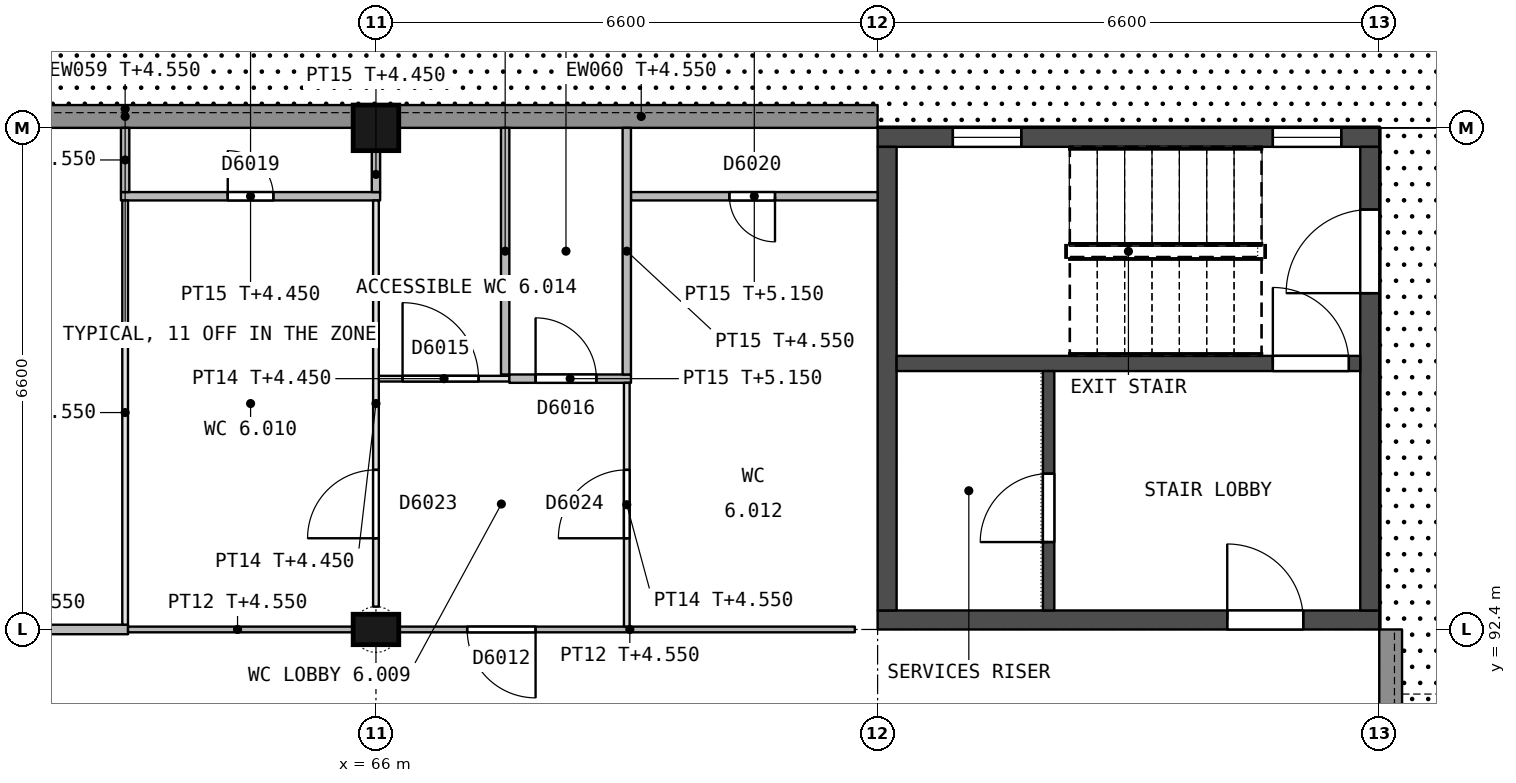
"""IFC4 building model, lengths in metres.
Left out: names, types, materials, properties, quantities, classifications, styles, units other than length and angle.
Written with IfcOpenShell. Run it as: python <this file> out.ifc"""

import sys

from ifc_helpers import new_model, si_unit, direction, frame, frame_2d, origin, origin_2d, place, context, subcontext, project, spatial, rectangle, extrude, element, fill, save


model = new_model("IFC4")
c1 = context("Model", 3, precision=1e-05, world=origin(), true_north=direction((0.0, 1.0)))
c2 = subcontext(c1, "Body", "Model", "MODEL_VIEW")
j1 = project(units=[si_unit("LENGTHUNIT", "METRE"), si_unit("PLANEANGLEUNIT", "RADIAN")], contexts=[c1])
p1 = place(None, origin())
s1 = spatial("IfcSite", under=j1, at=p1, CompositionType="ELEMENT")
p2 = place(p1, origin())
s2 = spatial("IfcBuilding", under=s1, at=p2, CompositionType="ELEMENT")
p3 = place(p2, origin())
s3 = spatial("IfcBuildingStorey", under=s2, at=p3, CompositionType="ELEMENT", Elevation=0.0)
p4 = place(p3, frame((66.0, 92.4, 0.0), z_axis=(0.0, 0.0, 1.0), x_axis=(1.0, 0.0, 0.0)))
e1 = element("IfcColumn", 1, at=p4, inside=s3, PredefinedType="COLUMN", context=c2, shape_type="SweptSolid", body=[
    extrude(rectangle(XDim=0.6, YDim=0.4, at=origin_2d()), origin(), (0.0, 0.0, 1.0), 5.4),
])
p5 = place(p3, frame((66.0, 99.0, 0.0), z_axis=(0.0, 0.0, 1.0), x_axis=(1.0, 0.0, 0.0)))
e2 = element("IfcColumn", 2, at=p5, inside=s3, PredefinedType="COLUMN", context=c2, shape_type="SweptSolid", body=[
    extrude(rectangle(XDim=0.6, YDim=0.6, at=origin_2d()), origin(), (0.0, 0.0, 1.0), 5.4),
])
p6 = place(p3, frame((72.6, 92.525, 0.0), z_axis=(0.0, 0.0, 1.0), x_axis=(1.0, 0.0, 0.0)))
e3 = element("IfcWall", 3, at=p6, inside=s3, PredefinedType="SHEAR", context=c2, shape_type="SweptSolid", body=[
    extrude(rectangle(XDim=6.6, YDim=0.25, at=frame_2d((3.3, 0.0))), origin(), (0.0, 0.0, 1.0), 5.15),
])
p7 = place(p6, frame((4.6, 0.0, 0.0)))
e4 = element("IfcOpeningElement", 4, at=p7, cuts=e3, PredefinedType="OPENING", context=c2, shape_type="SweptSolid", body=[
    extrude(rectangle(XDim=1.0, YDim=2.1, at=frame_2d((0.5, 1.05))), frame((0.0, 0.135, 0.0), z_axis=(0.0, -1.0, 0.0), x_axis=(1.0, 0.0, 0.0)), (0.0, 0.0, 1.0), 0.27),
])
p8 = place(p3, frame((72.6, 98.875, 0.0), z_axis=(0.0, 0.0, 1.0), x_axis=(1.0, 0.0, 0.0)))
e5 = element("IfcWall", 5, at=p8, inside=s3, PredefinedType="SHEAR", context=c2, shape_type="SweptSolid", body=[
    extrude(rectangle(XDim=6.6, YDim=0.25, at=frame_2d((3.3, 0.0))), origin(), (0.0, 0.0, 1.0), 5.15),
])
p9 = place(p8, frame((0.99, 0.0, 2.05)))
e6 = element("IfcOpeningElement", 6, at=p9, cuts=e5, PredefinedType="OPENING", context=c2, shape_type="SweptSolid", body=[
    extrude(rectangle(XDim=0.9, YDim=1.2, at=frame_2d((0.45, 0.6))), frame((0.0, 0.135, 0.0), z_axis=(0.0, -1.0, 0.0), x_axis=(1.0, 0.0, 0.0)), (0.0, 0.0, 1.0), 0.27),
])
p10 = place(p8, frame((5.2, 0.0, 3.4)))
e7 = element("IfcOpeningElement", 7, at=p10, cuts=e5, PredefinedType="OPENING", context=c2, shape_type="SweptSolid", body=[
    extrude(rectangle(XDim=0.9, YDim=1.2, at=frame_2d((0.45, 0.6))), frame((0.0, 0.135, 0.0), z_axis=(0.0, -1.0, 0.0), x_axis=(1.0, 0.0, 0.0)), (0.0, 0.0, 1.0), 0.27),
])
p11 = place(p3, frame((79.075, 92.65, 0.0), z_axis=(0.0, 0.0, 1.0), x_axis=(0.0, 1.0, 0.0)))
e8 = element("IfcWall", 8, at=p11, inside=s3, PredefinedType="SHEAR", context=c2, shape_type="SweptSolid", body=[
    extrude(rectangle(XDim=6.1, YDim=0.25, at=frame_2d((3.05, 0.0))), origin(), (0.0, 0.0, 1.0), 5.15),
])
p12 = place(p11, frame((4.175, 0.0, 0.0)))
e9 = element("IfcOpeningElement", 9, at=p12, cuts=e8, PredefinedType="OPENING", context=c2, shape_type="SweptSolid", body=[
    extrude(rectangle(XDim=1.1, YDim=2.4, at=frame_2d((0.55, 1.2))), frame((0.0, 0.135, 0.0), z_axis=(0.0, -1.0, 0.0), x_axis=(1.0, 0.0, 0.0)), (0.0, 0.0, 1.0), 0.27),
])
p13 = place(p3, frame((72.725, 92.65, 0.0), z_axis=(0.0, 0.0, 1.0), x_axis=(0.0, 1.0, 0.0)))
e10 = element("IfcWall", 10, at=p13, inside=s3, PredefinedType="SHEAR", context=c2, shape_type="SweptSolid", body=[
    extrude(rectangle(XDim=6.1, YDim=0.25, at=frame_2d((3.05, 0.0))), origin(), (0.0, 0.0, 1.0), 5.15),
])
p14 = place(p3, frame((72.85, 95.9, 0.0), z_axis=(0.0, 0.0, 1.0), x_axis=(1.0, 0.0, 0.0)))
e11 = element("IfcWall", 11, at=p14, inside=s3, PredefinedType="SHEAR", context=c2, shape_type="SweptSolid", body=[
    extrude(rectangle(XDim=6.1, YDim=0.2, at=frame_2d((3.05, 0.0))), origin(), (0.0, 0.0, 1.0), 5.15),
])
p15 = place(p14, frame((4.95, 0.0, 0.0)))
e12 = element("IfcOpeningElement", 12, at=p15, cuts=e11, PredefinedType="OPENING", context=c2, shape_type="SweptSolid", body=[
    extrude(rectangle(XDim=1.0, YDim=2.1, at=frame_2d((0.5, 1.05))), frame((0.0, 0.11, 0.0), z_axis=(0.0, -1.0, 0.0), x_axis=(1.0, 0.0, 0.0)), (0.0, 0.0, 1.0), 0.22),
])
p16 = place(p3, frame((74.85, 92.65, 0.0), z_axis=(0.0, 0.0, 1.0), x_axis=(0.0, 1.0, 0.0)))
e13 = element("IfcWall", 13, at=p16, inside=s3, PredefinedType="SHEAR", context=c2, shape_type="SweptSolid", body=[
    extrude(rectangle(XDim=3.15, YDim=0.15, at=frame_2d((1.575, 0.0))), origin(), (0.0, 0.0, 1.0), 5.15),
])
p17 = place(p16, frame((0.9, 0.0, 0.0)))
e14 = element("IfcOpeningElement", 14, at=p17, cuts=e13, PredefinedType="OPENING", context=c2, shape_type="SweptSolid", body=[
    extrude(rectangle(XDim=0.9, YDim=2.1, at=frame_2d((0.45, 1.05))), frame((0.0, 0.085, 0.0), z_axis=(0.0, -1.0, 0.0), x_axis=(1.0, 0.0, 0.0)), (0.0, 0.0, 1.0), 0.17),
])
p18 = place(p3, frame((79.35, 92.4, 0.0), z_axis=(0.0, 0.0, 1.0), x_axis=(0.0, -1.0, 0.0)))
e15 = element("IfcWall", 15, at=p18, inside=s3, PredefinedType="STANDARD", context=c2, shape_type="SweptSolid", body=[
    extrude(rectangle(XDim=3.1, YDim=0.3, at=frame_2d((1.55, 0.0))), origin(), (0.0, 0.0, 1.0), 4.55),
])
p19 = place(p18, frame((1.05, 0.0, 1.1)))
e16 = element("IfcOpeningElement", 16, at=p19, cuts=e15, PredefinedType="OPENING", context=c2, shape_type="SweptSolid", body=[
    extrude(rectangle(XDim=1.2, YDim=1.2, at=frame_2d((0.6, 0.6))), frame((0.0, 0.16, 0.0), z_axis=(0.0, -1.0, 0.0), x_axis=(1.0, 0.0, 0.0)), (0.0, 0.0, 1.0), 0.32),
])
p20 = place(p3, frame((59.7, 99.15, 0.0), z_axis=(0.0, 0.0, 1.0), x_axis=(1.0, 0.0, 0.0)))
e17 = element("IfcWall", 17, at=p20, inside=s3, PredefinedType="STANDARD", context=c2, shape_type="SweptSolid", body=[
    extrude(rectangle(XDim=6.0, YDim=0.3, at=frame_2d((3.0, 0.0))), origin(), (0.0, 0.0, 1.0), 4.55),
])
p21 = place(p3, frame((66.3, 99.15, 0.0), z_axis=(0.0, 0.0, 1.0), x_axis=(1.0, 0.0, 0.0)))
e18 = element("IfcWall", 18, at=p21, inside=s3, PredefinedType="STANDARD", context=c2, shape_type="SweptSolid", body=[
    extrude(rectangle(XDim=6.3, YDim=0.3, at=frame_2d((3.15, 0.0))), origin(), (0.0, 0.0, 1.0), 4.55),
])
p22 = place(p3, frame((59.7, 92.4, 0.0), z_axis=(0.0, 0.0, 1.0), x_axis=(1.0, 0.0, 0.0)))
e19 = element("IfcWall", 19, at=p22, inside=s3, PredefinedType="PARTITIONING", context=c2, shape_type="SweptSolid", body=[
    extrude(rectangle(XDim=3.038, YDim=0.125, at=frame_2d((1.519, 0.0))), origin(), (0.0, 0.0, 1.0), 4.55),
])
p23 = place(p3, frame((62.738, 92.4, 0.0), z_axis=(0.0, 0.0, 1.0), x_axis=(1.0, 0.0, 0.0)))
e20 = element("IfcWall", 20, at=p23, inside=s3, PredefinedType="PARTITIONING", context=c2, shape_type="SweptSolid", body=[
    extrude(rectangle(XDim=2.962, YDim=0.075, at=frame_2d((1.481, 0.0))), origin(), (0.0, 0.0, 1.0), 4.55),
])
p24 = place(p3, frame((66.3, 92.4, 0.0), z_axis=(0.0, 0.0, 1.0), x_axis=(1.0, 0.0, 0.0)))
e21 = element("IfcWall", 21, at=p24, inside=s3, PredefinedType="PARTITIONING", context=c2, shape_type="SweptSolid", body=[
    extrude(rectangle(XDim=6.0, YDim=0.075, at=frame_2d((3.0, 0.0))), origin(), (0.0, 0.0, 1.0), 4.55),
])
p25 = place(p24, frame((0.9, 0.0, 0.0)))
e22 = element("IfcOpeningElement", 22, at=p25, cuts=e21, PredefinedType="OPENING", context=c2, shape_type="SweptSolid", body=[
    extrude(rectangle(XDim=0.9, YDim=2.1, at=frame_2d((0.45, 1.05))), frame((0.0, 0.047, 0.0), z_axis=(0.0, -1.0, 0.0), x_axis=(1.0, 0.0, 0.0)), (0.0, 0.0, 1.0), 0.095),
])
p26 = place(p3, frame((67.755, 95.7, 0.0), z_axis=(0.0, 0.0, 1.0), x_axis=(-1.0, 0.0, 0.0)))
e23 = element("IfcWall", 23, at=p26, inside=s3, PredefinedType="PARTITIONING", context=c2, shape_type="SweptSolid", body=[
    extrude(rectangle(XDim=1.718, YDim=0.075, at=frame_2d((0.859, 0.0))), origin(), (0.0, 0.0, 1.0), 4.45),
])
p27 = place(p26, frame((0.405, 0.0, 0.0)))
e24 = element("IfcOpeningElement", 24, at=p27, cuts=e23, PredefinedType="OPENING", context=c2, shape_type="SweptSolid", body=[
    extrude(rectangle(XDim=1.0, YDim=2.1, at=frame_2d((0.5, 1.05))), frame((0.0, 0.047, 0.0), z_axis=(0.0, -1.0, 0.0), x_axis=(1.0, 0.0, 0.0)), (0.0, 0.0, 1.0), 0.095),
])
p28 = place(p3, frame((67.755, 95.7, 0.0), z_axis=(0.0, 0.0, 1.0), x_axis=(1.0, 0.0, 0.0)))
e25 = element("IfcWall", 25, at=p28, inside=s3, PredefinedType="PARTITIONING", context=c2, shape_type="SweptSolid", body=[
    extrude(rectangle(XDim=1.6, YDim=0.11, at=frame_2d((0.8, 0.0))), origin(), (0.0, 0.0, 1.0), 5.15),
])
p29 = place(p28, frame((0.345, 0.0, 0.0)))
e26 = element("IfcOpeningElement", 26, at=p29, cuts=e25, PredefinedType="OPENING", context=c2, shape_type="SweptSolid", body=[
    extrude(rectangle(XDim=0.8, YDim=2.1, at=frame_2d((0.4, 1.05))), frame((0.0, 0.065, 0.0), z_axis=(0.0, -1.0, 0.0), x_axis=(1.0, 0.0, 0.0)), (0.0, 0.0, 1.0), 0.13),
])
p30 = place(p3, frame((66.055, 98.1, 0.0), z_axis=(0.0, 0.0, 1.0), x_axis=(-1.0, 0.0, 0.0)))
e27 = element("IfcWall", 27, at=p30, inside=s3, PredefinedType="PARTITIONING", context=c2, shape_type="SweptSolid", body=[
    extrude(rectangle(XDim=3.41, YDim=0.11, at=frame_2d((1.705, 0.0))), origin(), (0.0, 0.0, 1.0), 4.45),
])
p31 = place(p30, frame((1.405, 0.0, 0.0)))
e28 = element("IfcOpeningElement", 28, at=p31, cuts=e27, PredefinedType="OPENING", context=c2, shape_type="SweptSolid", body=[
    extrude(rectangle(XDim=0.6, YDim=2.1, at=frame_2d((0.3, 1.05))), frame((0.0, 0.065, 0.0), z_axis=(0.0, -1.0, 0.0), x_axis=(1.0, 0.0, 0.0)), (0.0, 0.0, 1.0), 0.13),
])
p32 = place(p3, frame((72.6, 98.1, 0.0), z_axis=(0.0, 0.0, 1.0), x_axis=(-1.0, 0.0, 0.0)))
e29 = element("IfcWall", 29, at=p32, inside=s3, PredefinedType="PARTITIONING", context=c2, shape_type="SweptSolid", body=[
    extrude(rectangle(XDim=3.245, YDim=0.11, at=frame_2d((1.623, 0.0))), origin(), (0.0, 0.0, 1.0), 5.15),
])
p33 = place(p32, frame((1.35, 0.0, 0.0)))
e30 = element("IfcOpeningElement", 30, at=p33, cuts=e29, PredefinedType="OPENING", context=c2, shape_type="SweptSolid", body=[
    extrude(rectangle(XDim=0.6, YDim=2.1, at=frame_2d((0.3, 1.05))), frame((0.0, 0.065, 0.0), z_axis=(0.0, -1.0, 0.0), x_axis=(1.0, 0.0, 0.0)), (0.0, 0.0, 1.0), 0.13),
])
p34 = place(p3, frame((62.7, 92.463, 0.0), z_axis=(0.0, 0.0, 1.0), x_axis=(0.0, 1.0, 0.0)))
e31 = element("IfcWall", 31, at=p34, inside=s3, PredefinedType="PARTITIONING", context=c2, shape_type="SweptSolid", body=[
    extrude(rectangle(XDim=5.582, YDim=0.075, at=frame_2d((2.791, 0.0))), origin(), (0.0, 0.0, 1.0), 4.55),
])
p35 = place(p3, frame((62.7, 98.155, 0.0), z_axis=(0.0, 0.0, 1.0), x_axis=(0.0, 1.0, 0.0)))
e32 = element("IfcWall", 32, at=p35, inside=s3, PredefinedType="PARTITIONING", context=c2, shape_type="SweptSolid", body=[
    extrude(rectangle(XDim=0.845, YDim=0.11, at=frame_2d((0.422, 0.0))), origin(), (0.0, 0.0, 1.0), 4.55),
])
p36 = place(p3, frame((66.0, 92.7, 0.0), z_axis=(0.0, 0.0, 1.0), x_axis=(0.0, 1.0, 0.0)))
e33 = element("IfcWall", 33, at=p36, inside=s3, PredefinedType="PARTITIONING", context=c2, shape_type="SweptSolid", body=[
    extrude(rectangle(XDim=5.345, YDim=0.075, at=frame_2d((2.672, 0.0))), origin(), (0.0, 0.0, 1.0), 4.45),
])
p37 = place(p36, frame((0.9, 0.0, 0.0)))
e34 = element("IfcOpeningElement", 34, at=p37, cuts=e33, PredefinedType="OPENING", context=c2, shape_type="SweptSolid", body=[
    extrude(rectangle(XDim=0.9, YDim=2.1, at=frame_2d((0.45, 1.05))), frame((0.0, 0.047, 0.0), z_axis=(0.0, -1.0, 0.0), x_axis=(1.0, 0.0, 0.0)), (0.0, 0.0, 1.0), 0.095),
])
p38 = place(p3, frame((66.0, 98.155, 0.0), z_axis=(0.0, 0.0, 1.0), x_axis=(0.0, 1.0, 0.0)))
e35 = element("IfcWall", 35, at=p38, inside=s3, PredefinedType="PARTITIONING", context=c2, shape_type="SweptSolid", body=[
    extrude(rectangle(XDim=0.545, YDim=0.11, at=frame_2d((0.272, 0.0))), origin(), (0.0, 0.0, 1.0), 4.45),
])
p39 = place(p3, frame((67.7, 95.755, 0.0), z_axis=(0.0, 0.0, 1.0), x_axis=(0.0, 1.0, 0.0)))
e36 = element("IfcWall", 36, at=p39, inside=s3, PredefinedType="PARTITIONING", context=c2, shape_type="SweptSolid", body=[
    extrude(rectangle(XDim=3.245, YDim=0.11, at=frame_2d((1.623, 0.0))), origin(), (0.0, 0.0, 1.0), 4.55),
])
p40 = place(p3, frame((69.3, 95.645, 0.0), z_axis=(0.0, 0.0, 1.0), x_axis=(0.0, -1.0, 0.0)))
e37 = element("IfcWall", 37, at=p40, inside=s3, PredefinedType="PARTITIONING", context=c2, shape_type="SweptSolid", body=[
    extrude(rectangle(XDim=3.207, YDim=0.075, at=frame_2d((1.604, 0.0))), origin(), (0.0, 0.0, 1.0), 4.55),
])
p41 = place(p40, frame((1.145, 0.0, 0.0)))
e38 = element("IfcOpeningElement", 38, at=p41, cuts=e37, PredefinedType="OPENING", context=c2, shape_type="SweptSolid", body=[
    extrude(rectangle(XDim=0.9, YDim=2.1, at=frame_2d((0.45, 1.05))), frame((0.0, 0.047, 0.0), z_axis=(0.0, -1.0, 0.0), x_axis=(1.0, 0.0, 0.0)), (0.0, 0.0, 1.0), 0.095),
])
p42 = place(p3, frame((69.3, 95.755, 0.0), z_axis=(0.0, 0.0, 1.0), x_axis=(0.0, 1.0, 0.0)))
e39 = element("IfcWall", 39, at=p42, inside=s3, PredefinedType="PARTITIONING", context=c2, shape_type="SweptSolid", body=[
    extrude(rectangle(XDim=3.245, YDim=0.11, at=frame_2d((1.623, 0.0))), origin(), (0.0, 0.0, 1.0), 4.55),
])
p43 = place(p17, origin())
e40 = element("IfcDoor", 40, at=p43, inside=s3, OperationType="SINGLE_SWING_LEFT", PredefinedType="DOOR", context=c2, shape_type="SweptSolid", body=[
    extrude(rectangle(XDim=0.9, YDim=2.1, at=frame_2d((0.45, 1.05))), frame((0.0, 0.025, 0.0), z_axis=(0.0, -1.0, 0.0), x_axis=(1.0, 0.0, 0.0)), (0.0, 0.0, 1.0), 0.05),
])
fill(e14, e40)
p44 = place(p7, origin())
e41 = element("IfcDoor", 41, at=p44, inside=s3, OperationType="SINGLE_SWING_LEFT", PredefinedType="DOOR", context=c2, shape_type="SweptSolid", body=[
    extrude(rectangle(XDim=1.0, YDim=2.1, at=frame_2d((0.5, 1.05))), frame((0.0, 0.025, 0.0), z_axis=(0.0, -1.0, 0.0), x_axis=(1.0, 0.0, 0.0)), (0.0, 0.0, 1.0), 0.05),
])
fill(e4, e41)
p45 = place(p15, origin())
e42 = element("IfcDoor", 42, at=p45, inside=s3, OperationType="SINGLE_SWING_LEFT", PredefinedType="DOOR", context=c2, shape_type="SweptSolid", body=[
    extrude(rectangle(XDim=1.0, YDim=2.1, at=frame_2d((0.5, 1.05))), frame((0.0, 0.025, 0.0), z_axis=(0.0, -1.0, 0.0), x_axis=(1.0, 0.0, 0.0)), (0.0, 0.0, 1.0), 0.05),
])
fill(e12, e42)
p46 = place(p12, origin())
e43 = element("IfcDoor", 43, at=p46, inside=s3, OperationType="SINGLE_SWING_LEFT", PredefinedType="DOOR", context=c2, shape_type="SweptSolid", body=[
    extrude(rectangle(XDim=1.1, YDim=2.4, at=frame_2d((0.55, 1.2))), frame((0.0, 0.025, 0.0), z_axis=(0.0, -1.0, 0.0), x_axis=(1.0, 0.0, 0.0)), (0.0, 0.0, 1.0), 0.05),
])
fill(e9, e43)
p47 = place(p9, origin())
e44 = element("IfcWindow", 44, at=p47, inside=s3, PartitioningType="SINGLE_PANEL", PredefinedType="WINDOW", context=c2, shape_type="SweptSolid", body=[
    extrude(rectangle(XDim=0.9, YDim=1.2, at=frame_2d((0.45, 0.6))), frame((0.0, 0.03, 0.0), z_axis=(0.0, -1.0, 0.0), x_axis=(1.0, 0.0, 0.0)), (0.0, 0.0, 1.0), 0.06),
])
fill(e6, e44)
p48 = place(p10, origin())
e45 = element("IfcWindow", 45, at=p48, inside=s3, PartitioningType="SINGLE_PANEL", PredefinedType="WINDOW", context=c2, shape_type="SweptSolid", body=[
    extrude(rectangle(XDim=0.9, YDim=1.2, at=frame_2d((0.45, 0.6))), frame((0.0, 0.03, 0.0), z_axis=(0.0, -1.0, 0.0), x_axis=(1.0, 0.0, 0.0)), (0.0, 0.0, 1.0), 0.06),
])
fill(e7, e45)
p49 = place(p25, origin())
e46 = element("IfcDoor", 46, at=p49, inside=s3, OperationType="SINGLE_SWING_RIGHT", PredefinedType="DOOR", context=c2, shape_type="SweptSolid", body=[
    extrude(rectangle(XDim=0.9, YDim=2.1, at=frame_2d((0.45, 1.05))), frame((0.0, 0.025, 0.0), z_axis=(0.0, -1.0, 0.0), x_axis=(1.0, 0.0, 0.0)), (0.0, 0.0, 1.0), 0.05),
])
fill(e22, e46)
p50 = place(p27, origin())
e47 = element("IfcDoor", 47, at=p50, inside=s3, OperationType="SINGLE_SWING_RIGHT", PredefinedType="DOOR", context=c2, shape_type="SweptSolid", body=[
    extrude(rectangle(XDim=1.0, YDim=2.1, at=frame_2d((0.5, 1.05))), frame((0.0, 0.025, 0.0), z_axis=(0.0, -1.0, 0.0), x_axis=(1.0, 0.0, 0.0)), (0.0, 0.0, 1.0), 0.05),
])
fill(e24, e47)
p51 = place(p29, origin())
e48 = element("IfcDoor", 48, at=p51, inside=s3, OperationType="SINGLE_SWING_LEFT", PredefinedType="DOOR", context=c2, shape_type="SweptSolid", body=[
    extrude(rectangle(XDim=0.8, YDim=2.1, at=frame_2d((0.4, 1.05))), frame((0.0, 0.025, 0.0), z_axis=(0.0, -1.0, 0.0), x_axis=(1.0, 0.0, 0.0)), (0.0, 0.0, 1.0), 0.05),
])
fill(e26, e48)
p52 = place(p31, origin())
e49 = element("IfcDoor", 49, at=p52, inside=s3, OperationType="SINGLE_SWING_RIGHT", PredefinedType="DOOR", context=c2, shape_type="SweptSolid", body=[
    extrude(rectangle(XDim=0.6, YDim=2.1, at=frame_2d((0.3, 1.05))), frame((0.0, 0.025, 0.0), z_axis=(0.0, -1.0, 0.0), x_axis=(1.0, 0.0, 0.0)), (0.0, 0.0, 1.0), 0.05),
])
fill(e28, e49)
p53 = place(p33, origin())
e50 = element("IfcDoor", 50, at=p53, inside=s3, OperationType="SINGLE_SWING_LEFT", PredefinedType="DOOR", context=c2, shape_type="SweptSolid", body=[
    extrude(rectangle(XDim=0.6, YDim=2.1, at=frame_2d((0.3, 1.05))), frame((0.0, 0.025, 0.0), z_axis=(0.0, -1.0, 0.0), x_axis=(1.0, 0.0, 0.0)), (0.0, 0.0, 1.0), 0.05),
])
fill(e30, e50)
p54 = place(p37, origin())
e51 = element("IfcDoor", 51, at=p54, inside=s3, OperationType="SINGLE_SWING_LEFT", PredefinedType="DOOR", context=c2, shape_type="SweptSolid", body=[
    extrude(rectangle(XDim=0.9, YDim=2.1, at=frame_2d((0.45, 1.05))), frame((0.0, 0.025, 0.0), z_axis=(0.0, -1.0, 0.0), x_axis=(1.0, 0.0, 0.0)), (0.0, 0.0, 1.0), 0.05),
])
fill(e34, e51)
p55 = place(p41, origin())
e52 = element("IfcDoor", 52, at=p55, inside=s3, OperationType="SINGLE_SWING_RIGHT", PredefinedType="DOOR", context=c2, shape_type="SweptSolid", body=[
    extrude(rectangle(XDim=0.9, YDim=2.1, at=frame_2d((0.45, 1.05))), frame((0.0, 0.025, 0.0), z_axis=(0.0, -1.0, 0.0), x_axis=(1.0, 0.0, 0.0)), (0.0, 0.0, 1.0), 0.05),
])
fill(e38, e52)
save(model, sys.argv[1])
